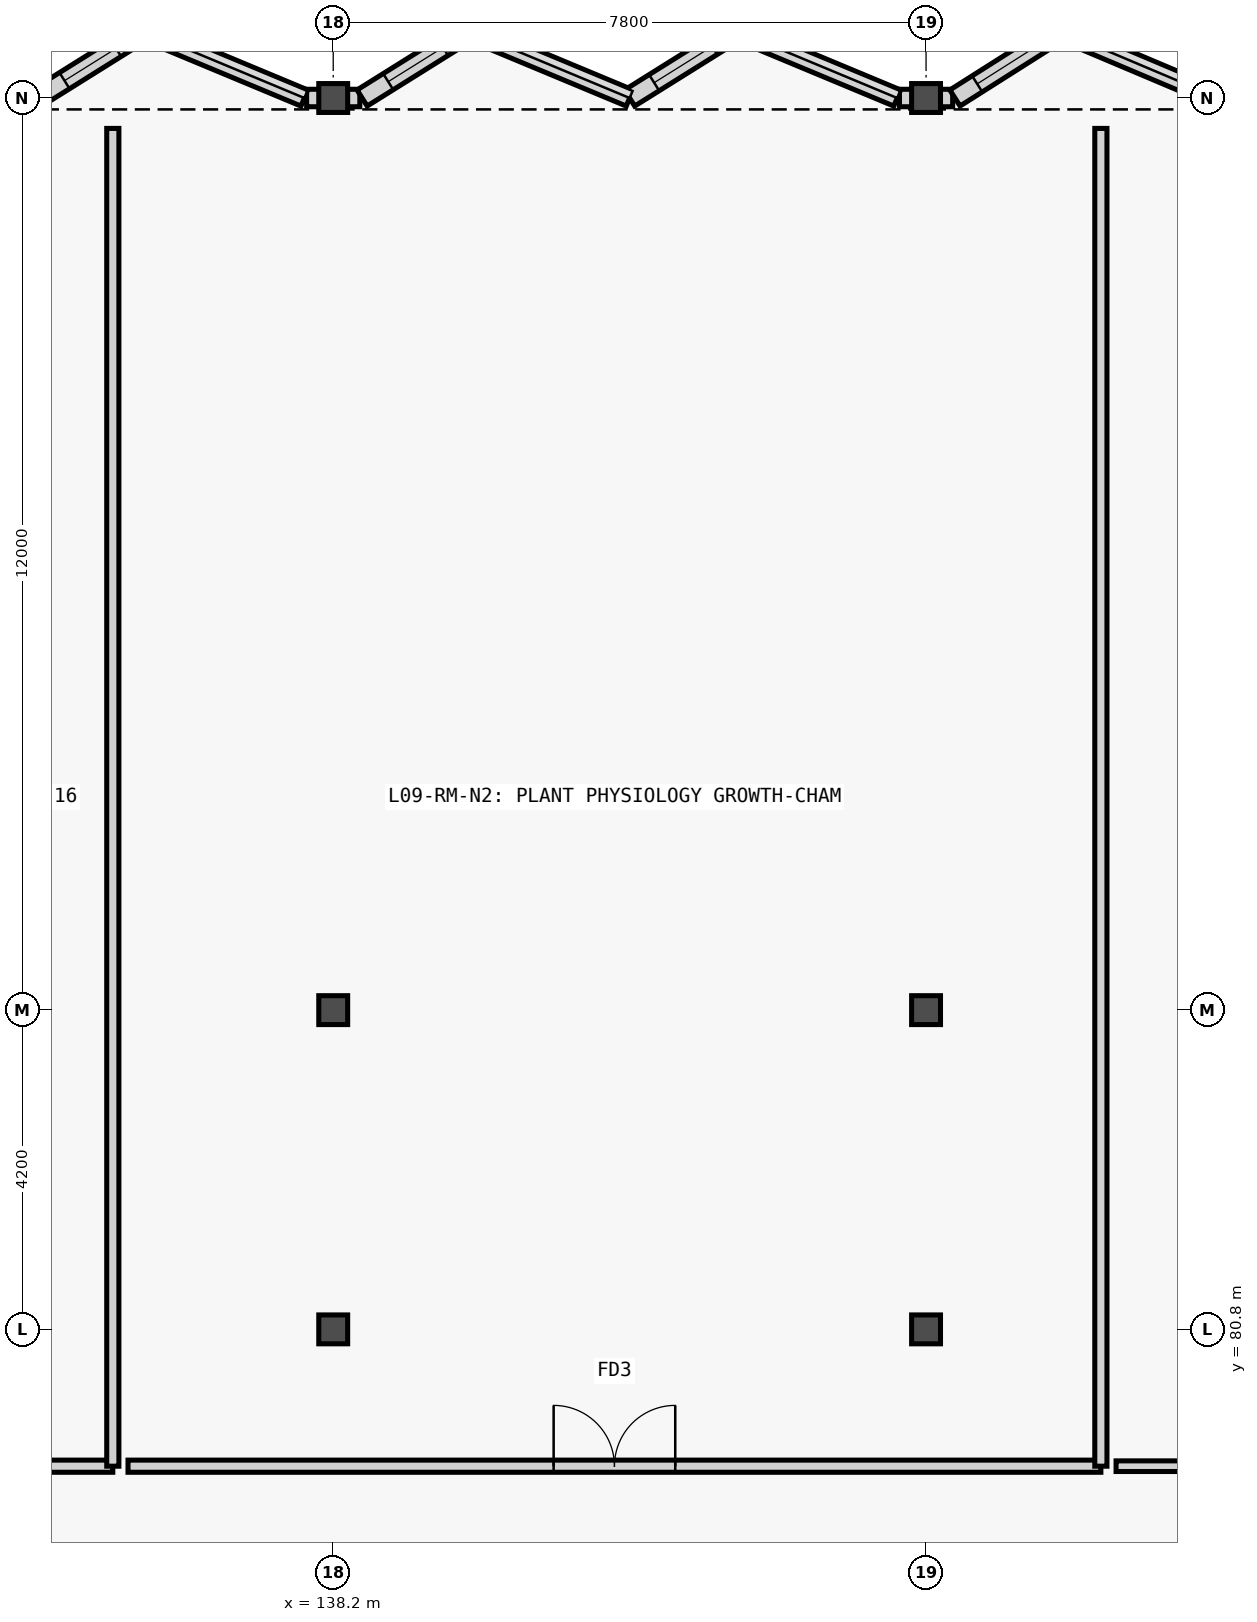
"""IFC4 building model, lengths in metres.
Left out: names, types, materials, properties, quantities, classifications, styles, units other than length and angle.
Written with IfcOpenShell. Run it as: python <this file> out.ifc"""

import sys

from ifc_helpers import new_model, si_unit, direction, frame, frame_2d, origin, origin_2d, place, context, subcontext, project, spatial, rectangle, extrude, element, fill, save


model = new_model("IFC4")
c1 = context("Model", 3, precision=1e-05, world=origin(), true_north=direction((0.0, 1.0)))
c2 = subcontext(c1, "Body", "Model", "MODEL_VIEW")
j1 = project(units=[si_unit("LENGTHUNIT", "METRE"), si_unit("PLANEANGLEUNIT", "RADIAN")], contexts=[c1])
p1 = place(None, origin())
s1 = spatial("IfcSite", under=j1, at=p1, CompositionType="ELEMENT")
p2 = place(p1, origin())
s2 = spatial("IfcBuilding", under=s1, at=p2, CompositionType="ELEMENT")
p3 = place(p2, frame((0.0, 0.0, 36.0)))
s3 = spatial("IfcBuildingStorey", under=s2, at=p3, CompositionType="ELEMENT", Elevation=36.0)
for number, where, z_axis, x_axis in (
    (1, (138.2, 80.8, 0.0), (0.0, 0.0, 1.0), (1.0, 0.0, 0.0)),
    (2, (138.2, 85.0, 0.0), (0.0, 0.0, 1.0), (1.0, 0.0, 0.0)),
    (3, (138.2, 97.0, 0.0), (0.0, 0.0, 1.0), (1.0, 0.0, 0.0)),
    (4, (146.0, 80.8, 0.0), (0.0, 0.0, 1.0), (1.0, 0.0, 0.0)),
    (5, (146.0, 85.0, 0.0), (0.0, 0.0, 1.0), (1.0, 0.0, 0.0)),
    (6, (146.0, 97.0, 0.0), (0.0, 0.0, 1.0), (1.0, 0.0, 0.0)),
):
    element("IfcColumn", number, at=place(p3, frame(where, z_axis=z_axis, x_axis=x_axis)), inside=s3, PredefinedType="COLUMN", context=c2, shape_type="SweptSolid", body=[
        extrude(rectangle(XDim=0.38, YDim=0.38, at=origin_2d()), origin(), (0.0, 0.0, 1.0), 3.6),
    ])
p4 = place(p3, frame((137.85, 97.0, 0.0), z_axis=(0.0, 0.0, 1.0), x_axis=(1.0, 0.0, 0.0)))
e7 = element("IfcWall", 7, at=p4, inside=s3, PredefinedType="SOLIDWALL", context=c2, shape_type="SweptSolid", body=[
    extrude(rectangle(XDim=0.35, YDim=0.23, at=frame_2d((0.175, 0.0))), origin(), (0.0, 0.0, 1.0), 3.36),
])
for number, where, z_axis, x_axis in (
    (8, (138.2, 97.0, 0.0), (0.0, 0.0, 1.0), (1.0, 0.0, 0.0)),
    (9, (145.65, 97.0, 0.0), (0.0, 0.0, 1.0), (1.0, 0.0, 0.0)),
    (10, (146.0, 97.0, 0.0), (0.0, 0.0, 1.0), (1.0, 0.0, 0.0)),
):
    element("IfcWall", number, at=place(p3, frame(where, z_axis=z_axis, x_axis=x_axis)), inside=s3, PredefinedType="SOLIDWALL", context=c2, shape_type="SweptSolid", body=[
        extrude(rectangle(XDim=0.35, YDim=0.23, at=frame_2d((0.175, 0.0))), origin(), (0.0, 0.0, 1.0), 3.36),
    ])
p5 = place(p3, frame((134.3, 97.0, 0.0), z_axis=(0.0, 0.0, 1.0), x_axis=(0.848023086369, 0.529959286158, 0.0)))
e11 = element("IfcWall", 11, at=p5, inside=s3, PredefinedType="SOLIDWALL", context=c2, shape_type="SweptSolid", body=[
    extrude(rectangle(XDim=1.66, YDim=0.25, at=frame_2d((0.83, 0.0))), origin(), (0.0, 0.0, 1.0), 3.36),
])
p6 = place(p5, frame((0.43, 0.0, 0.82)))
e12 = element("IfcOpeningElement", 12, at=p6, cuts=e11, PredefinedType="OPENING", context=c2, shape_type="SweptSolid", body=[
    extrude(rectangle(XDim=0.8, YDim=1.35, at=frame_2d((0.4, 0.675))), frame((0.0, 0.135, 0.0), z_axis=(0.0, -1.0, 0.0), x_axis=(1.0, 0.0, 0.0)), (0.0, 0.0, 1.0), 0.27),
])
p7 = place(p3, frame((135.708, 97.88, 0.0), z_axis=(0.0, 0.0, 1.0), x_axis=(0.92309902008, -0.384562347517, 0.0)))
e13 = element("IfcWall", 13, at=p7, inside=s3, PredefinedType="SOLIDWALL", context=c2, shape_type="SweptSolid", body=[
    extrude(rectangle(XDim=2.288, YDim=0.23, at=frame_2d((1.144, 0.0))), origin(), (0.0, 0.0, 1.0), 3.36),
])
p8 = place(p3, frame((138.58, 97.0, 0.0), z_axis=(0.0, 0.0, 1.0), x_axis=(0.848023086369, 0.529959286158, 0.0)))
e14 = element("IfcWall", 14, at=p8, inside=s3, PredefinedType="SOLIDWALL", context=c2, shape_type="SweptSolid", body=[
    extrude(rectangle(XDim=1.66, YDim=0.25, at=frame_2d((0.83, 0.0))), origin(), (0.0, 0.0, 1.0), 3.36),
])
p9 = place(p8, frame((0.405, 0.0, 0.82)))
e15 = element("IfcOpeningElement", 15, at=p9, cuts=e14, PredefinedType="OPENING", context=c2, shape_type="SweptSolid", body=[
    extrude(rectangle(XDim=0.85, YDim=1.4, at=frame_2d((0.425, 0.7))), frame((0.0, 0.135, 0.0), z_axis=(0.0, -1.0, 0.0), x_axis=(1.0, 0.0, 0.0)), (0.0, 0.0, 1.0), 0.27),
])
p10 = place(p3, frame((139.988, 97.88, 0.0), z_axis=(0.0, 0.0, 1.0), x_axis=(0.92309902008, -0.384562347517, 0.0)))
e16 = element("IfcWall", 16, at=p10, inside=s3, PredefinedType="SOLIDWALL", context=c2, shape_type="SweptSolid", body=[
    extrude(rectangle(XDim=2.288, YDim=0.23, at=frame_2d((1.144, 0.0))), origin(), (0.0, 0.0, 1.0), 3.36),
])
p11 = place(p3, frame((142.1, 97.0, 0.0), z_axis=(0.0, 0.0, 1.0), x_axis=(0.848023086369, 0.529959286158, 0.0)))
e17 = element("IfcWall", 17, at=p11, inside=s3, PredefinedType="SOLIDWALL", context=c2, shape_type="SweptSolid", body=[
    extrude(rectangle(XDim=1.66, YDim=0.25, at=frame_2d((0.83, 0.0))), origin(), (0.0, 0.0, 1.0), 3.36),
])
p12 = place(p11, frame((0.38, 0.0, 0.82)))
e18 = element("IfcOpeningElement", 18, at=p12, cuts=e17, PredefinedType="OPENING", context=c2, shape_type="SweptSolid", body=[
    extrude(rectangle(XDim=0.9, YDim=1.45, at=frame_2d((0.45, 0.725))), frame((0.0, 0.135, 0.0), z_axis=(0.0, -1.0, 0.0), x_axis=(1.0, 0.0, 0.0)), (0.0, 0.0, 1.0), 0.27),
])
p13 = place(p3, frame((143.508, 97.88, 0.0), z_axis=(0.0, 0.0, 1.0), x_axis=(0.92309902008, -0.384562347517, 0.0)))
e19 = element("IfcWall", 19, at=p13, inside=s3, PredefinedType="SOLIDWALL", context=c2, shape_type="SweptSolid", body=[
    extrude(rectangle(XDim=2.288, YDim=0.23, at=frame_2d((1.144, 0.0))), origin(), (0.0, 0.0, 1.0), 3.36),
])
p14 = place(p3, frame((146.38, 97.0, 0.0), z_axis=(0.0, 0.0, 1.0), x_axis=(0.844626536799, 0.535355968805, 0.0)))
e20 = element("IfcWall", 20, at=p14, inside=s3, PredefinedType="SOLIDWALL", context=c2, shape_type="SweptSolid", body=[
    extrude(rectangle(XDim=1.644, YDim=0.25, at=frame_2d((0.822, 0.0))), origin(), (0.0, 0.0, 1.0), 3.36),
])
p15 = place(p14, frame((0.347, 0.0, 0.82)))
e21 = element("IfcOpeningElement", 21, at=p15, cuts=e20, PredefinedType="OPENING", context=c2, shape_type="SweptSolid", body=[
    extrude(rectangle(XDim=0.95, YDim=1.5, at=frame_2d((0.475, 0.75))), frame((0.0, 0.135, 0.0), z_axis=(0.0, -1.0, 0.0), x_axis=(1.0, 0.0, 0.0)), (0.0, 0.0, 1.0), 0.27),
])
p16 = place(p3, frame((147.768, 97.88, 0.0), z_axis=(0.0, 0.0, 1.0), x_axis=(0.921122216024, -0.389273506866, 0.0)))
e22 = element("IfcWall", 22, at=p16, inside=s3, PredefinedType="SOLIDWALL", context=c2, shape_type="SweptSolid", body=[
    extrude(rectangle(XDim=2.26, YDim=0.23, at=frame_2d((1.13, 0.0))), origin(), (0.0, 0.0, 1.0), 3.36),
])
p17 = place(p3, frame((122.8, 79.0, 0.0), z_axis=(0.0, 0.0, 1.0), x_axis=(1.0, 0.0, 0.0)))
e23 = element("IfcWall", 23, at=p17, inside=s3, PredefinedType="PARTITIONING", context=c2, shape_type="SweptSolid", body=[
    extrude(rectangle(XDim=12.5, YDim=0.16, at=frame_2d((6.25, 0.0))), origin(), (0.0, 0.0, 1.0), 3.34),
])
p18 = place(p17, frame((5.45, 0.0, 0.0)))
e24 = element("IfcOpeningElement", 24, at=p18, cuts=e23, PredefinedType="OPENING", context=c2, shape_type="SweptSolid", body=[
    extrude(rectangle(XDim=1.6, YDim=2.2, at=frame_2d((0.8, 1.1))), frame((0.0, 0.09, 0.0), z_axis=(0.0, -1.0, 0.0), x_axis=(1.0, 0.0, 0.0)), (0.0, 0.0, 1.0), 0.18),
])
p19 = place(p3, frame((135.3, 79.0, 0.0), z_axis=(0.0, 0.0, 1.0), x_axis=(0.0, 1.0, 0.0)))
e25 = element("IfcWall", 25, at=p19, inside=s3, PredefinedType="PARTITIONING", context=c2, shape_type="SweptSolid", body=[
    extrude(rectangle(XDim=17.6, YDim=0.16, at=frame_2d((8.8, 0.0))), origin(), (0.0, 0.0, 1.0), 3.34),
])
p20 = place(p3, frame((135.5, 79.0, 0.0), z_axis=(0.0, 0.0, 1.0), x_axis=(1.0, 0.0, 0.0)))
e26 = element("IfcWall", 26, at=p20, inside=s3, PredefinedType="PARTITIONING", context=c2, shape_type="SweptSolid", body=[
    extrude(rectangle(XDim=12.8, YDim=0.16, at=frame_2d((6.4, 0.0))), origin(), (0.0, 0.0, 1.0), 3.34),
])
p21 = place(p20, frame((5.6, 0.0, 0.0)))
e27 = element("IfcOpeningElement", 27, at=p21, cuts=e26, PredefinedType="OPENING", context=c2, shape_type="SweptSolid", body=[
    extrude(rectangle(XDim=1.6, YDim=2.2, at=frame_2d((0.8, 1.1))), frame((0.0, 0.09, 0.0), z_axis=(0.0, -1.0, 0.0), x_axis=(1.0, 0.0, 0.0)), (0.0, 0.0, 1.0), 0.18),
])
p22 = place(p3, frame((148.3, 79.0, 0.0), z_axis=(0.0, 0.0, 1.0), x_axis=(0.0, 1.0, 0.0)))
e28 = element("IfcWall", 28, at=p22, inside=s3, PredefinedType="PARTITIONING", context=c2, shape_type="SweptSolid", body=[
    extrude(rectangle(XDim=17.6, YDim=0.16, at=frame_2d((8.8, 0.0))), origin(), (0.0, 0.0, 1.0), 3.34),
])
p23 = place(p3, frame((148.5, 79.0, 0.0), z_axis=(0.0, 0.0, 1.0), x_axis=(1.0, 0.0, 0.0)))
e29 = element("IfcWall", 29, at=p23, inside=s3, PredefinedType="PARTITIONING", context=c2, shape_type="SweptSolid", body=[
    extrude(rectangle(XDim=12.1, YDim=0.14, at=frame_2d((6.05, 0.0))), origin(), (0.0, 0.0, 1.0), 3.34),
])
p24 = place(p23, frame((5.49, 0.0, 0.0)))
e30 = element("IfcOpeningElement", 30, at=p24, cuts=e29, PredefinedType="OPENING", context=c2, shape_type="SweptSolid", body=[
    extrude(rectangle(XDim=1.12, YDim=2.15, at=frame_2d((0.56, 1.075))), frame((0.0, 0.08, 0.0), z_axis=(0.0, -1.0, 0.0), x_axis=(1.0, 0.0, 0.0)), (0.0, 0.0, 1.0), 0.16),
])
p25 = place(p6, origin())
e31 = element("IfcWindow", 31, at=p25, inside=s3, PartitioningType="SINGLE_PANEL", PredefinedType="WINDOW", context=c2, shape_type="SweptSolid", body=[
    extrude(rectangle(XDim=0.8, YDim=1.35, at=frame_2d((0.4, 0.675))), frame((0.0, 0.03, 0.0), z_axis=(0.0, -1.0, 0.0), x_axis=(1.0, 0.0, 0.0)), (0.0, 0.0, 1.0), 0.06),
])
fill(e12, e31)
p26 = place(p9, origin())
e32 = element("IfcWindow", 32, at=p26, inside=s3, PartitioningType="SINGLE_PANEL", PredefinedType="WINDOW", context=c2, shape_type="SweptSolid", body=[
    extrude(rectangle(XDim=0.85, YDim=1.4, at=frame_2d((0.425, 0.7))), frame((0.0, 0.03, 0.0), z_axis=(0.0, -1.0, 0.0), x_axis=(1.0, 0.0, 0.0)), (0.0, 0.0, 1.0), 0.06),
])
fill(e15, e32)
p27 = place(p12, origin())
e33 = element("IfcWindow", 33, at=p27, inside=s3, PartitioningType="SINGLE_PANEL", PredefinedType="WINDOW", context=c2, shape_type="SweptSolid", body=[
    extrude(rectangle(XDim=0.9, YDim=1.45, at=frame_2d((0.45, 0.725))), frame((0.0, 0.03, 0.0), z_axis=(0.0, -1.0, 0.0), x_axis=(1.0, 0.0, 0.0)), (0.0, 0.0, 1.0), 0.06),
])
fill(e18, e33)
p28 = place(p15, origin())
e34 = element("IfcWindow", 34, at=p28, inside=s3, PartitioningType="SINGLE_PANEL", PredefinedType="WINDOW", context=c2, shape_type="SweptSolid", body=[
    extrude(rectangle(XDim=0.95, YDim=1.5, at=frame_2d((0.475, 0.75))), frame((0.0, 0.03, 0.0), z_axis=(0.0, -1.0, 0.0), x_axis=(1.0, 0.0, 0.0)), (0.0, 0.0, 1.0), 0.06),
])
fill(e21, e34)
p29 = place(p21, origin())
e35 = element("IfcDoor", 35, at=p29, inside=s3, OperationType="DOUBLE_DOOR_SINGLE_SWING", PredefinedType="DOOR", context=c2, shape_type="SweptSolid", body=[
    extrude(rectangle(XDim=1.6, YDim=2.2, at=frame_2d((0.8, 1.1))), frame((0.0, 0.025, 0.0), z_axis=(0.0, -1.0, 0.0), x_axis=(1.0, 0.0, 0.0)), (0.0, 0.0, 1.0), 0.05),
])
fill(e27, e35)
save(model, sys.argv[1])
